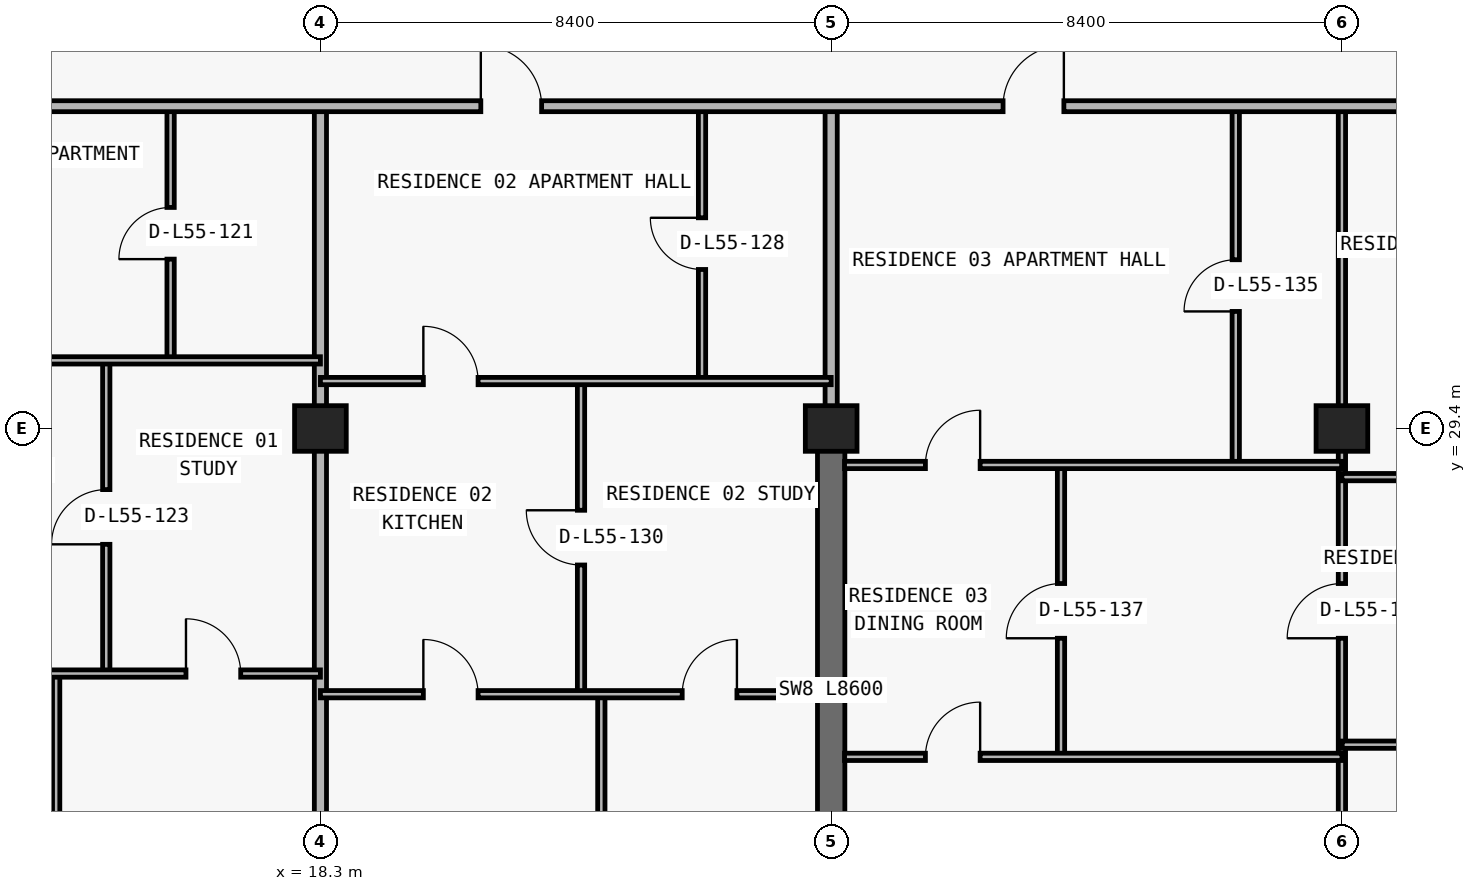
"""IFC4 building model, lengths in metres.
Left out: names, types, materials, properties, quantities, classifications, styles, units other than length and angle.
Written with IfcOpenShell. Run it as: python <this file> out.ifc"""

import sys

from ifc_helpers import new_model, si_unit, direction, frame, frame_2d, origin, origin_2d, place, context, subcontext, project, spatial, rectangle, extrude, element, fill, save


model = new_model("IFC4")
c1 = context("Model", 3, precision=1e-05, world=origin(), true_north=direction((0.0, 1.0)))
c2 = subcontext(c1, "Body", "Model", "MODEL_VIEW")
j1 = project(units=[si_unit("LENGTHUNIT", "METRE"), si_unit("PLANEANGLEUNIT", "RADIAN")], contexts=[c1])
p1 = place(None, origin())
s1 = spatial("IfcSite", under=j1, at=p1, CompositionType="ELEMENT")
p2 = place(p1, origin())
s2 = spatial("IfcBuilding", under=s1, at=p2, CompositionType="ELEMENT")
p3 = place(p2, frame((0.0, 0.0, 198.3)))
s3 = spatial("IfcBuildingStorey", under=s2, at=p3, CompositionType="ELEMENT", Elevation=198.3)
for number, where, z_axis, x_axis in (
    (1, (18.3, 29.4, 0.0), (0.0, 0.0, 1.0), (1.0, 0.0, 0.0)),
    (2, (26.7, 29.4, 0.0), (0.0, 0.0, 1.0), (1.0, 0.0, 0.0)),
    (3, (35.1, 29.4, 0.0), (0.0, 0.0, 1.0), (1.0, 0.0, 0.0)),
):
    element("IfcColumn", number, at=place(p3, frame(where, z_axis=z_axis, x_axis=x_axis)), inside=s3, PredefinedType="COLUMN", context=c2, shape_type="SweptSolid", body=[
        extrude(rectangle(XDim=0.85, YDim=0.75, at=origin_2d()), origin(), (0.0, 0.0, 1.0), 3.05),
    ])
p4 = place(p3, frame((26.7, 20.8, 0.0), z_axis=(0.0, 0.0, 1.0), x_axis=(0.0, 1.0, 0.0)))
e4 = element("IfcWall", 4, at=p4, inside=s3, PredefinedType="SHEAR", context=c2, shape_type="SweptSolid", body=[
    extrude(rectangle(XDim=8.6, YDim=0.45, at=frame_2d((4.3, 0.0))), origin(), (0.0, 0.0, 1.0), 3.05),
])
p5 = place(p3, frame((13.954, 11.24, 0.0), z_axis=(0.0, 0.0, 1.0), x_axis=(0.0, 1.0, 0.0)))
e5 = element("IfcWall", 5, at=p5, inside=s3, PredefinedType="PARTITIONING", context=c2, shape_type="SweptSolid", body=[
    extrude(rectangle(XDim=14.13, YDim=0.12, at=frame_2d((7.065, 0.0))), origin(), (0.0, 0.0, 1.0), 2.725),
])
p6 = place(p3, frame((14.778, 25.37, 0.0), z_axis=(0.0, 0.0, 1.0), x_axis=(0.0, 1.0, 0.0)))
e6 = element("IfcWall", 6, at=p6, inside=s3, PredefinedType="PARTITIONING", context=c2, shape_type="SweptSolid", body=[
    extrude(rectangle(XDim=5.15, YDim=0.12, at=frame_2d((2.575, 0.0))), origin(), (0.0, 0.0, 1.0), 3.05),
])
p7 = place(p6, frame((2.125, 0.0, 0.0)))
e7 = element("IfcOpeningElement", 7, at=p7, cuts=e6, PredefinedType="OPENING", context=c2, shape_type="SweptSolid", body=[
    extrude(rectangle(XDim=0.9, YDim=2.15, at=frame_2d((0.45, 1.075))), frame((0.0, 0.07, 0.0), z_axis=(0.0, -1.0, 0.0), x_axis=(1.0, 0.0, 0.0)), (0.0, 0.0, 1.0), 0.14),
])
p8 = place(p3, frame((15.836, 30.52, 0.0), z_axis=(0.0, 0.0, 1.0), x_axis=(0.0, 1.0, 0.0)))
e8 = element("IfcWall", 8, at=p8, inside=s3, PredefinedType="PARTITIONING", context=c2, shape_type="SweptSolid", body=[
    extrude(rectangle(XDim=4.18, YDim=0.12, at=frame_2d((2.09, 0.0))), origin(), (0.0, 0.0, 1.0), 3.05),
])
p9 = place(p8, frame((1.665, 0.0, 0.0)))
e9 = element("IfcOpeningElement", 9, at=p9, cuts=e8, PredefinedType="OPENING", context=c2, shape_type="SweptSolid", body=[
    extrude(rectangle(XDim=0.85, YDim=2.1, at=frame_2d((0.425, 1.05))), frame((0.0, 0.07, 0.0), z_axis=(0.0, -1.0, 0.0), x_axis=(1.0, 0.0, 0.0)), (0.0, 0.0, 1.0), 0.14),
])
p10 = place(p3, frame((18.3, 11.24, 0.0), z_axis=(0.0, 0.0, 1.0), x_axis=(0.0, 1.0, 0.0)))
e10 = element("IfcWall", 10, at=p10, inside=s3, PredefinedType="PARTITIONING", context=c2, shape_type="SweptSolid", body=[
    extrude(rectangle(XDim=23.46, YDim=0.2, at=frame_2d((11.73, 0.0))), origin(), (0.0, 0.0, 1.0), 2.263),
])
p11 = place(p3, frame((22.586, 25.03, 0.0), z_axis=(0.0, 0.0, 1.0), x_axis=(0.0, 1.0, 0.0)))
e11 = element("IfcWall", 11, at=p11, inside=s3, PredefinedType="PARTITIONING", context=c2, shape_type="SweptSolid", body=[
    extrude(rectangle(XDim=5.15, YDim=0.12, at=frame_2d((2.575, 0.0))), origin(), (0.0, 0.0, 1.0), 2.725),
])
p12 = place(p11, frame((2.125, 0.0, 0.0)))
e12 = element("IfcOpeningElement", 12, at=p12, cuts=e11, PredefinedType="OPENING", context=c2, shape_type="SweptSolid", body=[
    extrude(rectangle(XDim=0.9, YDim=2.15, at=frame_2d((0.45, 1.075))), frame((0.0, 0.07, 0.0), z_axis=(0.0, -1.0, 0.0), x_axis=(1.0, 0.0, 0.0)), (0.0, 0.0, 1.0), 0.14),
])
p13 = place(p3, frame((22.92, 11.24, 0.0), z_axis=(0.0, 0.0, 1.0), x_axis=(0.0, 1.0, 0.0)))
e13 = element("IfcWall", 13, at=p13, inside=s3, PredefinedType="PARTITIONING", context=c2, shape_type="SweptSolid", body=[
    extrude(rectangle(XDim=13.79, YDim=0.12, at=frame_2d((6.895, 0.0))), origin(), (0.0, 0.0, 1.0), 3.05),
])
p14 = place(p3, frame((24.576, 30.18, 0.0), z_axis=(0.0, 0.0, 1.0), x_axis=(0.0, 1.0, 0.0)))
e14 = element("IfcWall", 14, at=p14, inside=s3, PredefinedType="PARTITIONING", context=c2, shape_type="SweptSolid", body=[
    extrude(rectangle(XDim=4.52, YDim=0.12, at=frame_2d((2.26, 0.0))), origin(), (0.0, 0.0, 1.0), 3.05),
])
p15 = place(p14, frame((1.835, 0.0, 0.0)))
e15 = element("IfcOpeningElement", 15, at=p15, cuts=e14, PredefinedType="OPENING", context=c2, shape_type="SweptSolid", body=[
    extrude(rectangle(XDim=0.85, YDim=2.1, at=frame_2d((0.425, 1.05))), frame((0.0, 0.07, 0.0), z_axis=(0.0, -1.0, 0.0), x_axis=(1.0, 0.0, 0.0)), (0.0, 0.0, 1.0), 0.14),
])
p16 = place(p3, frame((26.7, 29.405, 0.0), z_axis=(0.0, 0.0, 1.0), x_axis=(0.0, 1.0, 0.0)))
e16 = element("IfcWall", 16, at=p16, inside=s3, PredefinedType="PARTITIONING", context=c2, shape_type="SweptSolid", body=[
    extrude(rectangle(XDim=5.295, YDim=0.2, at=frame_2d((2.647, 0.0))), origin(), (0.0, 0.0, 1.0), 2.335),
])
p17 = place(p3, frame((30.48, 24.0, 0.0), z_axis=(0.0, 0.0, 1.0), x_axis=(0.0, 1.0, 0.0)))
e17 = element("IfcWall", 17, at=p17, inside=s3, PredefinedType="PARTITIONING", context=c2, shape_type="SweptSolid", body=[
    extrude(rectangle(XDim=4.8, YDim=0.12, at=frame_2d((2.4, 0.0))), origin(), (0.0, 0.0, 1.0), 3.05),
])
p18 = place(p17, frame((1.95, 0.0, 0.0)))
e18 = element("IfcOpeningElement", 18, at=p18, cuts=e17, PredefinedType="OPENING", context=c2, shape_type="SweptSolid", body=[
    extrude(rectangle(XDim=0.9, YDim=2.15, at=frame_2d((0.45, 1.075))), frame((0.0, 0.07, 0.0), z_axis=(0.0, -1.0, 0.0), x_axis=(1.0, 0.0, 0.0)), (0.0, 0.0, 1.0), 0.14),
])
p19 = place(p3, frame((33.354, 28.8, 0.0), z_axis=(0.0, 0.0, 1.0), x_axis=(0.0, 1.0, 0.0)))
e19 = element("IfcWall", 19, at=p19, inside=s3, PredefinedType="PARTITIONING", context=c2, shape_type="SweptSolid", body=[
    extrude(rectangle(XDim=5.9, YDim=0.12, at=frame_2d((2.95, 0.0))), origin(), (0.0, 0.0, 1.0), 3.05),
])
p20 = place(p19, frame((2.525, 0.0, 0.0)))
e20 = element("IfcOpeningElement", 20, at=p20, cuts=e19, PredefinedType="OPENING", context=c2, shape_type="SweptSolid", body=[
    extrude(rectangle(XDim=0.85, YDim=2.1, at=frame_2d((0.425, 1.05))), frame((0.0, 0.07, 0.0), z_axis=(0.0, -1.0, 0.0), x_axis=(1.0, 0.0, 0.0)), (0.0, 0.0, 1.0), 0.14),
])
p21 = place(p3, frame((35.1, 11.24, 0.0), z_axis=(0.0, 0.0, 1.0), x_axis=(0.0, 1.0, 0.0)))
e21 = element("IfcWall", 21, at=p21, inside=s3, PredefinedType="PARTITIONING", context=c2, shape_type="SweptSolid", body=[
    extrude(rectangle(XDim=23.46, YDim=0.12, at=frame_2d((11.73, 0.0))), origin(), (0.0, 0.0, 1.0), 2.263),
])
p22 = place(p21, frame((14.71, 0.0, 0.0)))
e22 = element("IfcOpeningElement", 22, at=p22, cuts=e21, PredefinedType="OPENING", context=c2, shape_type="SweptSolid", body=[
    extrude(rectangle(XDim=0.9, YDim=2.15, at=frame_2d((0.45, 1.075))), frame((0.0, 0.07, 0.0), z_axis=(0.0, -1.0, 0.0), x_axis=(1.0, 0.0, 0.0)), (0.0, 0.0, 1.0), 0.14),
])
p23 = place(p3, frame((26.92, 24.0, 0.0), z_axis=(0.0, 0.0, 1.0), x_axis=(1.0, 0.0, 0.0)))
e23 = element("IfcWall", 23, at=p23, inside=s3, PredefinedType="PARTITIONING", context=c2, shape_type="SweptSolid", body=[
    extrude(rectangle(XDim=8.18, YDim=0.12, at=frame_2d((4.09, 0.0))), origin(), (0.0, 0.0, 1.0), 3.05),
])
p24 = place(p23, frame((1.33, 0.0, 0.0)))
e24 = element("IfcOpeningElement", 24, at=p24, cuts=e23, PredefinedType="OPENING", context=c2, shape_type="SweptSolid", body=[
    extrude(rectangle(XDim=0.9, YDim=2.15, at=frame_2d((0.45, 1.075))), frame((0.0, 0.07, 0.0), z_axis=(0.0, -1.0, 0.0), x_axis=(1.0, 0.0, 0.0)), (0.0, 0.0, 1.0), 0.14),
])
p25 = place(p3, frame((35.105, 24.2, 0.0), z_axis=(0.0, 0.0, 1.0), x_axis=(1.0, 0.0, 0.0)))
e25 = element("IfcWall", 25, at=p25, inside=s3, PredefinedType="PARTITIONING", context=c2, shape_type="SweptSolid", body=[
    extrude(rectangle(XDim=7.59, YDim=0.12, at=frame_2d((3.795, 0.0))), origin(), (0.0, 0.0, 1.0), 3.05),
])
p26 = place(p25, frame((3.345, 0.0, 0.0)))
e26 = element("IfcOpeningElement", 26, at=p26, cuts=e25, PredefinedType="OPENING", context=c2, shape_type="SweptSolid", body=[
    extrude(rectangle(XDim=0.9, YDim=2.15, at=frame_2d((0.45, 1.075))), frame((0.0, 0.07, 0.0), z_axis=(0.0, -1.0, 0.0), x_axis=(1.0, 0.0, 0.0)), (0.0, 0.0, 1.0), 0.14),
])
p27 = place(p3, frame((18.3, 25.03, 0.0), z_axis=(0.0, 0.0, 1.0), x_axis=(1.0, 0.0, 0.0)))
e27 = element("IfcWall", 27, at=p27, inside=s3, PredefinedType="PARTITIONING", context=c2, shape_type="SweptSolid", body=[
    extrude(rectangle(XDim=8.18, YDim=0.12, at=frame_2d((4.09, 0.0))), origin(), (0.0, 0.0, 1.0), 3.05),
])
p28 = place(p27, frame((1.693, 0.0, 0.0)))
e28 = element("IfcOpeningElement", 28, at=p28, cuts=e27, PredefinedType="OPENING", context=c2, shape_type="SweptSolid", body=[
    extrude(rectangle(XDim=0.9, YDim=2.15, at=frame_2d((0.45, 1.075))), frame((0.0, 0.07, 0.0), z_axis=(0.0, -1.0, 0.0), x_axis=(1.0, 0.0, 0.0)), (0.0, 0.0, 1.0), 0.14),
])
p29 = place(p27, frame((5.95, 0.0, 0.0)))
e29 = element("IfcOpeningElement", 29, at=p29, cuts=e27, PredefinedType="OPENING", context=c2, shape_type="SweptSolid", body=[
    extrude(rectangle(XDim=0.9, YDim=2.15, at=frame_2d((0.45, 1.075))), frame((0.0, 0.07, 0.0), z_axis=(0.0, -1.0, 0.0), x_axis=(1.0, 0.0, 0.0)), (0.0, 0.0, 1.0), 0.14),
])
p30 = place(p3, frame((10.1, 25.37, 0.0), z_axis=(0.0, 0.0, 1.0), x_axis=(1.0, 0.0, 0.0)))
e30 = element("IfcWall", 30, at=p30, inside=s3, PredefinedType="PARTITIONING", context=c2, shape_type="SweptSolid", body=[
    extrude(rectangle(XDim=8.2, YDim=0.12, at=frame_2d((4.1, 0.0))), origin(), (0.0, 0.0, 1.0), 3.05),
])
p31 = place(p30, frame((1.477, 0.0, 0.0)))
e31 = element("IfcOpeningElement", 31, at=p31, cuts=e30, PredefinedType="OPENING", context=c2, shape_type="SweptSolid", body=[
    extrude(rectangle(XDim=0.9, YDim=2.15, at=frame_2d((0.45, 1.075))), frame((0.0, 0.07, 0.0), z_axis=(0.0, -1.0, 0.0), x_axis=(1.0, 0.0, 0.0)), (0.0, 0.0, 1.0), 0.14),
])
p32 = place(p30, frame((5.989, 0.0, 0.0)))
e32 = element("IfcOpeningElement", 32, at=p32, cuts=e30, PredefinedType="OPENING", context=c2, shape_type="SweptSolid", body=[
    extrude(rectangle(XDim=0.9, YDim=2.15, at=frame_2d((0.45, 1.075))), frame((0.0, 0.07, 0.0), z_axis=(0.0, -1.0, 0.0), x_axis=(1.0, 0.0, 0.0)), (0.0, 0.0, 1.0), 0.14),
])
p33 = place(p3, frame((35.1, 28.6, 0.0), z_axis=(0.0, 0.0, 1.0), x_axis=(1.0, 0.0, 0.0)))
e33 = element("IfcWall", 33, at=p33, inside=s3, PredefinedType="PARTITIONING", context=c2, shape_type="SweptSolid", body=[
    extrude(rectangle(XDim=7.6, YDim=0.12, at=frame_2d((3.8, 0.0))), origin(), (0.0, 0.0, 1.0), 3.05),
])
p34 = place(p33, frame((2.563, 0.0, 0.0)))
e34 = element("IfcOpeningElement", 34, at=p34, cuts=e33, PredefinedType="OPENING", context=c2, shape_type="SweptSolid", body=[
    extrude(rectangle(XDim=0.9, YDim=2.15, at=frame_2d((0.45, 1.075))), frame((0.0, 0.07, 0.0), z_axis=(0.0, -1.0, 0.0), x_axis=(1.0, 0.0, 0.0)), (0.0, 0.0, 1.0), 0.14),
])
p35 = place(p3, frame((26.92, 28.8, 0.0), z_axis=(0.0, 0.0, 1.0), x_axis=(1.0, 0.0, 0.0)))
e35 = element("IfcWall", 35, at=p35, inside=s3, PredefinedType="PARTITIONING", context=c2, shape_type="SweptSolid", body=[
    extrude(rectangle(XDim=8.175, YDim=0.12, at=frame_2d((4.087, 0.0))), origin(), (0.0, 0.0, 1.0), 3.05),
])
p36 = place(p35, frame((1.33, 0.0, 0.0)))
e36 = element("IfcOpeningElement", 36, at=p36, cuts=e35, PredefinedType="OPENING", context=c2, shape_type="SweptSolid", body=[
    extrude(rectangle(XDim=0.9, YDim=2.15, at=frame_2d((0.45, 1.075))), frame((0.0, 0.07, 0.0), z_axis=(0.0, -1.0, 0.0), x_axis=(1.0, 0.0, 0.0)), (0.0, 0.0, 1.0), 0.14),
])
p37 = place(p3, frame((18.3, 30.18, 0.0), z_axis=(0.0, 0.0, 1.0), x_axis=(1.0, 0.0, 0.0)))
e37 = element("IfcWall", 37, at=p37, inside=s3, PredefinedType="PARTITIONING", context=c2, shape_type="SweptSolid", body=[
    extrude(rectangle(XDim=8.4, YDim=0.12, at=frame_2d((4.2, 0.0))), origin(), (0.0, 0.0, 1.0), 3.05),
])
p38 = place(p37, frame((1.693, 0.0, 0.0)))
e38 = element("IfcOpeningElement", 38, at=p38, cuts=e37, PredefinedType="OPENING", context=c2, shape_type="SweptSolid", body=[
    extrude(rectangle(XDim=0.9, YDim=2.15, at=frame_2d((0.45, 1.075))), frame((0.0, 0.07, 0.0), z_axis=(0.0, -1.0, 0.0), x_axis=(1.0, 0.0, 0.0)), (0.0, 0.0, 1.0), 0.14),
])
p39 = place(p3, frame((10.1, 30.52, 0.0), z_axis=(0.0, 0.0, 1.0), x_axis=(1.0, 0.0, 0.0)))
e39 = element("IfcWall", 39, at=p39, inside=s3, PredefinedType="PARTITIONING", context=c2, shape_type="SweptSolid", body=[
    extrude(rectangle(XDim=8.2, YDim=0.12, at=frame_2d((4.1, 0.0))), origin(), (0.0, 0.0, 1.0), 3.05),
])
p40 = place(p39, frame((1.889, 0.0, 0.0)))
e40 = element("IfcOpeningElement", 40, at=p40, cuts=e39, PredefinedType="OPENING", context=c2, shape_type="SweptSolid", body=[
    extrude(rectangle(XDim=0.9, YDim=2.15, at=frame_2d((0.45, 1.075))), frame((0.0, 0.07, 0.0), z_axis=(0.0, -1.0, 0.0), x_axis=(1.0, 0.0, 0.0)), (0.0, 0.0, 1.0), 0.14),
])
p41 = place(p3, frame((10.105, 34.7, 0.0), z_axis=(0.0, 0.0, 1.0), x_axis=(1.0, 0.0, 0.0)))
e41 = element("IfcWall", 41, at=p41, inside=s3, PredefinedType="PARTITIONING", context=c2, shape_type="SweptSolid", body=[
    extrude(rectangle(XDim=57.595, YDim=0.18, at=frame_2d((28.797, 0.0))), origin(), (0.0, 0.0, 1.0), 3.05),
])
p42 = place(p41, frame((2.365, 0.0, 0.0)))
e42 = element("IfcOpeningElement", 42, at=p42, cuts=e41, PredefinedType="OPENING", context=c2, shape_type="SweptSolid", body=[
    extrude(rectangle(XDim=1.0, YDim=2.2, at=frame_2d((0.5, 1.1))), frame((0.0, 0.1, 0.0), z_axis=(0.0, -1.0, 0.0), x_axis=(1.0, 0.0, 0.0)), (0.0, 0.0, 1.0), 0.2),
])
p43 = place(p41, frame((10.833, 0.0, 0.0)))
e43 = element("IfcOpeningElement", 43, at=p43, cuts=e41, PredefinedType="OPENING", context=c2, shape_type="SweptSolid", body=[
    extrude(rectangle(XDim=1.0, YDim=2.2, at=frame_2d((0.5, 1.1))), frame((0.0, 0.1, 0.0), z_axis=(0.0, -1.0, 0.0), x_axis=(1.0, 0.0, 0.0)), (0.0, 0.0, 1.0), 0.2),
])
p44 = place(p41, frame((19.422, 0.0, 0.0)))
e44 = element("IfcOpeningElement", 44, at=p44, cuts=e41, PredefinedType="OPENING", context=c2, shape_type="SweptSolid", body=[
    extrude(rectangle(XDim=1.0, YDim=2.2, at=frame_2d((0.5, 1.1))), frame((0.0, 0.1, 0.0), z_axis=(0.0, -1.0, 0.0), x_axis=(1.0, 0.0, 0.0)), (0.0, 0.0, 1.0), 0.2),
])
p45 = place(p41, frame((43.865, 0.0, 0.0)))
e45 = element("IfcOpeningElement", 45, at=p45, cuts=e41, PredefinedType="OPENING", context=c2, shape_type="SweptSolid", body=[
    extrude(rectangle(XDim=1.0, YDim=2.2, at=frame_2d((0.5, 1.1))), frame((0.0, 0.1, 0.0), z_axis=(0.0, -1.0, 0.0), x_axis=(1.0, 0.0, 0.0)), (0.0, 0.0, 1.0), 0.2),
])
p46 = place(p9, origin())
e46 = element("IfcDoor", 46, at=p46, inside=s3, OperationType="SINGLE_SWING_LEFT", PredefinedType="DOOR", context=c2, shape_type="SweptSolid", body=[
    extrude(rectangle(XDim=0.85, YDim=2.1, at=frame_2d((0.425, 1.05))), frame((0.0, 0.025, 0.0), z_axis=(0.0, -1.0, 0.0), x_axis=(1.0, 0.0, 0.0)), (0.0, 0.0, 1.0), 0.05),
])
fill(e9, e46)
p47 = place(p7, origin())
e47 = element("IfcDoor", 47, at=p47, inside=s3, OperationType="SINGLE_SWING_LEFT", PredefinedType="DOOR", context=c2, shape_type="SweptSolid", body=[
    extrude(rectangle(XDim=0.9, YDim=2.15, at=frame_2d((0.45, 1.075))), frame((0.0, 0.025, 0.0), z_axis=(0.0, -1.0, 0.0), x_axis=(1.0, 0.0, 0.0)), (0.0, 0.0, 1.0), 0.05),
])
fill(e7, e47)
p48 = place(p32, origin())
e48 = element("IfcDoor", 48, at=p48, inside=s3, OperationType="SINGLE_SWING_LEFT", PredefinedType="DOOR", context=c2, shape_type="SweptSolid", body=[
    extrude(rectangle(XDim=0.9, YDim=2.15, at=frame_2d((0.45, 1.075))), frame((0.0, 0.025, 0.0), z_axis=(0.0, -1.0, 0.0), x_axis=(1.0, 0.0, 0.0)), (0.0, 0.0, 1.0), 0.05),
])
fill(e32, e48)
p49 = place(p43, origin())
e49 = element("IfcDoor", 49, at=p49, inside=s3, OperationType="SINGLE_SWING_LEFT", PredefinedType="DOOR", context=c2, shape_type="SweptSolid", body=[
    extrude(rectangle(XDim=1.0, YDim=2.2, at=frame_2d((0.5, 1.1))), frame((0.0, 0.025, 0.0), z_axis=(0.0, -1.0, 0.0), x_axis=(1.0, 0.0, 0.0)), (0.0, 0.0, 1.0), 0.05),
])
fill(e43, e49)
p50 = place(p15, origin())
e50 = element("IfcDoor", 50, at=p50, inside=s3, OperationType="SINGLE_SWING_RIGHT", PredefinedType="DOOR", context=c2, shape_type="SweptSolid", body=[
    extrude(rectangle(XDim=0.85, YDim=2.1, at=frame_2d((0.425, 1.05))), frame((0.0, 0.025, 0.0), z_axis=(0.0, -1.0, 0.0), x_axis=(1.0, 0.0, 0.0)), (0.0, 0.0, 1.0), 0.05),
])
fill(e15, e50)
p51 = place(p38, origin())
e51 = element("IfcDoor", 51, at=p51, inside=s3, OperationType="SINGLE_SWING_LEFT", PredefinedType="DOOR", context=c2, shape_type="SweptSolid", body=[
    extrude(rectangle(XDim=0.9, YDim=2.15, at=frame_2d((0.45, 1.075))), frame((0.0, 0.025, 0.0), z_axis=(0.0, -1.0, 0.0), x_axis=(1.0, 0.0, 0.0)), (0.0, 0.0, 1.0), 0.05),
])
fill(e38, e51)
p52 = place(p12, origin())
e52 = element("IfcDoor", 52, at=p52, inside=s3, OperationType="SINGLE_SWING_RIGHT", PredefinedType="DOOR", context=c2, shape_type="SweptSolid", body=[
    extrude(rectangle(XDim=0.9, YDim=2.15, at=frame_2d((0.45, 1.075))), frame((0.0, 0.025, 0.0), z_axis=(0.0, -1.0, 0.0), x_axis=(1.0, 0.0, 0.0)), (0.0, 0.0, 1.0), 0.05),
])
fill(e12, e52)
p53 = place(p28, origin())
e53 = element("IfcDoor", 53, at=p53, inside=s3, OperationType="SINGLE_SWING_LEFT", PredefinedType="DOOR", context=c2, shape_type="SweptSolid", body=[
    extrude(rectangle(XDim=0.9, YDim=2.15, at=frame_2d((0.45, 1.075))), frame((0.0, 0.025, 0.0), z_axis=(0.0, -1.0, 0.0), x_axis=(1.0, 0.0, 0.0)), (0.0, 0.0, 1.0), 0.05),
])
fill(e28, e53)
p54 = place(p29, origin())
e54 = element("IfcDoor", 54, at=p54, inside=s3, OperationType="SINGLE_SWING_RIGHT", PredefinedType="DOOR", context=c2, shape_type="SweptSolid", body=[
    extrude(rectangle(XDim=0.9, YDim=2.15, at=frame_2d((0.45, 1.075))), frame((0.0, 0.025, 0.0), z_axis=(0.0, -1.0, 0.0), x_axis=(1.0, 0.0, 0.0)), (0.0, 0.0, 1.0), 0.05),
])
fill(e29, e54)
p55 = place(p44, origin())
e55 = element("IfcDoor", 55, at=p55, inside=s3, OperationType="SINGLE_SWING_RIGHT", PredefinedType="DOOR", context=c2, shape_type="SweptSolid", body=[
    extrude(rectangle(XDim=1.0, YDim=2.2, at=frame_2d((0.5, 1.1))), frame((0.0, 0.025, 0.0), z_axis=(0.0, -1.0, 0.0), x_axis=(1.0, 0.0, 0.0)), (0.0, 0.0, 1.0), 0.05),
])
fill(e44, e55)
p56 = place(p20, origin())
e56 = element("IfcDoor", 56, at=p56, inside=s3, OperationType="SINGLE_SWING_LEFT", PredefinedType="DOOR", context=c2, shape_type="SweptSolid", body=[
    extrude(rectangle(XDim=0.85, YDim=2.1, at=frame_2d((0.425, 1.05))), frame((0.0, 0.025, 0.0), z_axis=(0.0, -1.0, 0.0), x_axis=(1.0, 0.0, 0.0)), (0.0, 0.0, 1.0), 0.05),
])
fill(e20, e56)
p57 = place(p36, origin())
e57 = element("IfcDoor", 57, at=p57, inside=s3, OperationType="SINGLE_SWING_RIGHT", PredefinedType="DOOR", context=c2, shape_type="SweptSolid", body=[
    extrude(rectangle(XDim=0.9, YDim=2.15, at=frame_2d((0.45, 1.075))), frame((0.0, 0.025, 0.0), z_axis=(0.0, -1.0, 0.0), x_axis=(1.0, 0.0, 0.0)), (0.0, 0.0, 1.0), 0.05),
])
fill(e36, e57)
p58 = place(p18, origin())
e58 = element("IfcDoor", 58, at=p58, inside=s3, OperationType="SINGLE_SWING_LEFT", PredefinedType="DOOR", context=c2, shape_type="SweptSolid", body=[
    extrude(rectangle(XDim=0.9, YDim=2.15, at=frame_2d((0.45, 1.075))), frame((0.0, 0.025, 0.0), z_axis=(0.0, -1.0, 0.0), x_axis=(1.0, 0.0, 0.0)), (0.0, 0.0, 1.0), 0.05),
])
fill(e18, e58)
p59 = place(p24, origin())
e59 = element("IfcDoor", 59, at=p59, inside=s3, OperationType="SINGLE_SWING_RIGHT", PredefinedType="DOOR", context=c2, shape_type="SweptSolid", body=[
    extrude(rectangle(XDim=0.9, YDim=2.15, at=frame_2d((0.45, 1.075))), frame((0.0, 0.025, 0.0), z_axis=(0.0, -1.0, 0.0), x_axis=(1.0, 0.0, 0.0)), (0.0, 0.0, 1.0), 0.05),
])
fill(e24, e59)
p60 = place(p22, origin())
e60 = element("IfcDoor", 60, at=p60, inside=s3, OperationType="SINGLE_SWING_LEFT", PredefinedType="DOOR", context=c2, shape_type="SweptSolid", body=[
    extrude(rectangle(XDim=0.9, YDim=2.15, at=frame_2d((0.45, 1.075))), frame((0.0, 0.025, 0.0), z_axis=(0.0, -1.0, 0.0), x_axis=(1.0, 0.0, 0.0)), (0.0, 0.0, 1.0), 0.05),
])
fill(e22, e60)
save(model, sys.argv[1])
